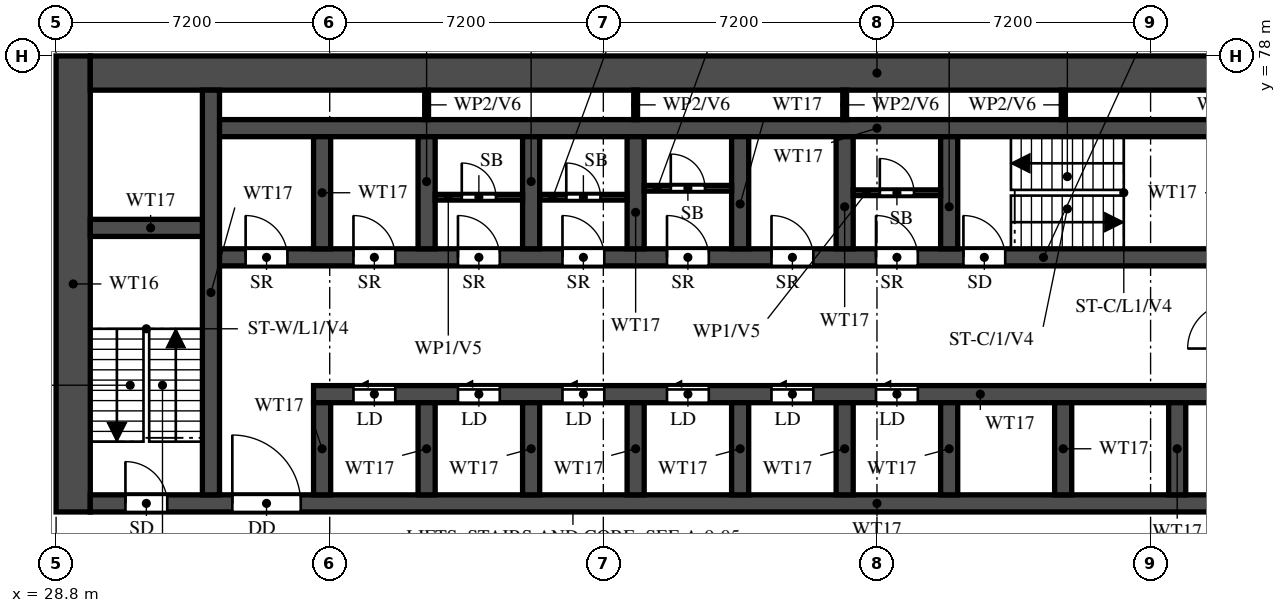
"""IFC4 building model, lengths in metres.
Left out: names, types, materials, properties, quantities, classifications, styles, units other than length and angle.
Written with IfcOpenShell. Run it as: python <this file> out.ifc"""

import sys

from ifc_helpers import new_model, si_unit, direction, frame, frame_2d, origin, place, context, subcontext, project, spatial, rectangle, extrude, element, fill, save


model = new_model("IFC4")
c1 = context("Model", 3, precision=1e-05, world=origin(), true_north=direction((0.0, 1.0)))
c2 = subcontext(c1, "Body", "Model", "MODEL_VIEW")
j1 = project(units=[si_unit("LENGTHUNIT", "METRE"), si_unit("PLANEANGLEUNIT", "RADIAN")], contexts=[c1])
p1 = place(None, origin())
s1 = spatial("IfcSite", under=j1, at=p1, CompositionType="ELEMENT")
p2 = place(p1, origin())
s2 = spatial("IfcBuilding", under=s1, at=p2, CompositionType="ELEMENT")
p3 = place(p2, frame((0.0, 0.0, 17.4)))
s3 = spatial("IfcBuildingStorey", under=s2, at=p3, CompositionType="ELEMENT", Elevation=17.4)
p4 = place(p3, frame((29.25, 66.0, 0.0), z_axis=(0.0, 0.0, 1.0), x_axis=(0.0, 1.0, 0.0)))
e1 = element("IfcWall", 1, at=p4, inside=s3, PredefinedType="SHEAR", context=c2, shape_type="SweptSolid", body=[
    extrude(rectangle(XDim=12.0, YDim=0.9, at=frame_2d((6.0, 0.0))), origin(), (0.0, 0.0, 1.0), 3.8),
])
p5 = place(p3, frame((29.7, 77.55, 0.0), z_axis=(0.0, 0.0, 1.0), x_axis=(1.0, 0.0, 0.0)))
e2 = element("IfcWall", 2, at=p5, inside=s3, PredefinedType="SHEAR", context=c2, shape_type="SweptSolid", body=[
    extrude(rectangle(XDim=41.4, YDim=0.9, at=frame_2d((20.7, 0.0))), origin(), (0.0, 0.0, 1.0), 3.8),
])
p6 = place(p3, frame((29.7, 66.225, 0.0), z_axis=(0.0, 0.0, 1.0), x_axis=(1.0, 0.0, 0.0)))
e3 = element("IfcWall", 3, at=p6, inside=s3, PredefinedType="SHEAR", context=c2, shape_type="SweptSolid", body=[
    extrude(rectangle(XDim=41.4, YDim=0.45, at=frame_2d((20.7, 0.0))), origin(), (0.0, 0.0, 1.0), 3.8),
])
p7 = place(p6, frame((0.925, 0.0, 0.0)))
e4 = element("IfcOpeningElement", 4, at=p7, cuts=e3, PredefinedType="OPENING", context=c2, shape_type="SweptSolid", body=[
    extrude(rectangle(XDim=1.1, YDim=2.1, at=frame_2d((0.55, 1.05))), frame((0.0, 0.235, 0.0), z_axis=(0.0, -1.0, 0.0), x_axis=(1.0, 0.0, 0.0)), (0.0, 0.0, 1.0), 0.47),
])
p8 = place(p6, frame((3.738, 0.0, 0.0)))
e5 = element("IfcOpeningElement", 5, at=p8, cuts=e3, PredefinedType="OPENING", context=c2, shape_type="SweptSolid", body=[
    extrude(rectangle(XDim=1.8, YDim=2.1, at=frame_2d((0.9, 1.05))), frame((0.0, 0.235, 0.0), z_axis=(0.0, -1.0, 0.0), x_axis=(1.0, 0.0, 0.0)), (0.0, 0.0, 1.0), 0.47),
])
p9 = place(p3, frame((35.575, 69.1, 0.0), z_axis=(0.0, 0.0, 1.0), x_axis=(1.0, 0.0, 0.0)))
e6 = element("IfcWall", 6, at=p9, inside=s3, PredefinedType="SHEAR", context=c2, shape_type="SweptSolid", body=[
    extrude(rectangle(XDim=24.2, YDim=0.45, at=frame_2d((12.1, 0.0))), origin(), (0.0, 0.0, 1.0), 3.8),
])
p10 = place(p9, frame((1.05, 0.0, 0.0)))
e7 = element("IfcOpeningElement", 7, at=p10, cuts=e6, PredefinedType="OPENING", context=c2, shape_type="SweptSolid", body=[
    extrude(rectangle(XDim=1.1, YDim=2.1, at=frame_2d((0.55, 1.05))), frame((0.0, 0.235, 0.0), z_axis=(0.0, -1.0, 0.0), x_axis=(1.0, 0.0, 0.0)), (0.0, 0.0, 1.0), 0.47),
])
p11 = place(p9, frame((3.8, 0.0, 0.0)))
e8 = element("IfcOpeningElement", 8, at=p11, cuts=e6, PredefinedType="OPENING", context=c2, shape_type="SweptSolid", body=[
    extrude(rectangle(XDim=1.1, YDim=2.1, at=frame_2d((0.55, 1.05))), frame((0.0, 0.235, 0.0), z_axis=(0.0, -1.0, 0.0), x_axis=(1.0, 0.0, 0.0)), (0.0, 0.0, 1.0), 0.47),
])
p12 = place(p9, frame((6.55, 0.0, 0.0)))
e9 = element("IfcOpeningElement", 9, at=p12, cuts=e6, PredefinedType="OPENING", context=c2, shape_type="SweptSolid", body=[
    extrude(rectangle(XDim=1.1, YDim=2.1, at=frame_2d((0.55, 1.05))), frame((0.0, 0.235, 0.0), z_axis=(0.0, -1.0, 0.0), x_axis=(1.0, 0.0, 0.0)), (0.0, 0.0, 1.0), 0.47),
])
p13 = place(p9, frame((9.3, 0.0, 0.0)))
e10 = element("IfcOpeningElement", 10, at=p13, cuts=e6, PredefinedType="OPENING", context=c2, shape_type="SweptSolid", body=[
    extrude(rectangle(XDim=1.1, YDim=2.1, at=frame_2d((0.55, 1.05))), frame((0.0, 0.235, 0.0), z_axis=(0.0, -1.0, 0.0), x_axis=(1.0, 0.0, 0.0)), (0.0, 0.0, 1.0), 0.47),
])
p14 = place(p9, frame((12.05, 0.0, 0.0)))
e11 = element("IfcOpeningElement", 11, at=p14, cuts=e6, PredefinedType="OPENING", context=c2, shape_type="SweptSolid", body=[
    extrude(rectangle(XDim=1.1, YDim=2.1, at=frame_2d((0.55, 1.05))), frame((0.0, 0.235, 0.0), z_axis=(0.0, -1.0, 0.0), x_axis=(1.0, 0.0, 0.0)), (0.0, 0.0, 1.0), 0.47),
])
p15 = place(p9, frame((14.8, 0.0, 0.0)))
e12 = element("IfcOpeningElement", 12, at=p15, cuts=e6, PredefinedType="OPENING", context=c2, shape_type="SweptSolid", body=[
    extrude(rectangle(XDim=1.1, YDim=2.1, at=frame_2d((0.55, 1.05))), frame((0.0, 0.235, 0.0), z_axis=(0.0, -1.0, 0.0), x_axis=(1.0, 0.0, 0.0)), (0.0, 0.0, 1.0), 0.47),
])
p16 = place(p3, frame((32.875, 72.7, 0.0), z_axis=(0.0, 0.0, 1.0), x_axis=(1.0, 0.0, 0.0)))
e13 = element("IfcWall", 13, at=p16, inside=s3, PredefinedType="SHEAR", context=c2, shape_type="SweptSolid", body=[
    extrude(rectangle(XDim=35.05, YDim=0.45, at=frame_2d((17.525, 0.0))), origin(), (0.0, 0.0, 1.0), 3.8),
])
p17 = place(p16, frame((19.8, 0.0, 0.0)))
e14 = element("IfcOpeningElement", 14, at=p17, cuts=e13, PredefinedType="OPENING", context=c2, shape_type="SweptSolid", body=[
    extrude(rectangle(XDim=1.1, YDim=2.1, at=frame_2d((0.55, 1.05))), frame((0.0, 0.235, 0.0), z_axis=(0.0, -1.0, 0.0), x_axis=(1.0, 0.0, 0.0)), (0.0, 0.0, 1.0), 0.47),
])
p18 = place(p16, frame((27.65, 0.0, 0.0)))
e15 = element("IfcOpeningElement", 15, at=p18, cuts=e13, PredefinedType="OPENING", context=c2, shape_type="SweptSolid", body=[
    extrude(rectangle(XDim=1.1, YDim=2.1, at=frame_2d((0.55, 1.05))), frame((0.0, 0.235, 0.0), z_axis=(0.0, -1.0, 0.0), x_axis=(1.0, 0.0, 0.0)), (0.0, 0.0, 1.0), 0.47),
])
p19 = place(p16, frame((30.25, 0.0, 0.0)))
e16 = element("IfcOpeningElement", 16, at=p19, cuts=e13, PredefinedType="OPENING", context=c2, shape_type="SweptSolid", body=[
    extrude(rectangle(XDim=1.1, YDim=2.1, at=frame_2d((0.55, 1.05))), frame((0.0, 0.235, 0.0), z_axis=(0.0, -1.0, 0.0), x_axis=(1.0, 0.0, 0.0)), (0.0, 0.0, 1.0), 0.47),
])
p20 = place(p16, frame((3.75, 0.0, 0.0)))
e17 = element("IfcOpeningElement", 17, at=p20, cuts=e13, PredefinedType="OPENING", context=c2, shape_type="SweptSolid", body=[
    extrude(rectangle(XDim=1.1, YDim=2.1, at=frame_2d((0.55, 1.05))), frame((0.0, 0.235, 0.0), z_axis=(0.0, -1.0, 0.0), x_axis=(1.0, 0.0, 0.0)), (0.0, 0.0, 1.0), 0.47),
])
p21 = place(p16, frame((6.5, 0.0, 0.0)))
e18 = element("IfcOpeningElement", 18, at=p21, cuts=e13, PredefinedType="OPENING", context=c2, shape_type="SweptSolid", body=[
    extrude(rectangle(XDim=1.1, YDim=2.1, at=frame_2d((0.55, 1.05))), frame((0.0, 0.235, 0.0), z_axis=(0.0, -1.0, 0.0), x_axis=(1.0, 0.0, 0.0)), (0.0, 0.0, 1.0), 0.47),
])
p22 = place(p16, frame((9.25, 0.0, 0.0)))
e19 = element("IfcOpeningElement", 19, at=p22, cuts=e13, PredefinedType="OPENING", context=c2, shape_type="SweptSolid", body=[
    extrude(rectangle(XDim=1.1, YDim=2.1, at=frame_2d((0.55, 1.05))), frame((0.0, 0.235, 0.0), z_axis=(0.0, -1.0, 0.0), x_axis=(1.0, 0.0, 0.0)), (0.0, 0.0, 1.0), 0.47),
])
p23 = place(p16, frame((12.0, 0.0, 0.0)))
e20 = element("IfcOpeningElement", 20, at=p23, cuts=e13, PredefinedType="OPENING", context=c2, shape_type="SweptSolid", body=[
    extrude(rectangle(XDim=1.1, YDim=2.1, at=frame_2d((0.55, 1.05))), frame((0.0, 0.235, 0.0), z_axis=(0.0, -1.0, 0.0), x_axis=(1.0, 0.0, 0.0)), (0.0, 0.0, 1.0), 0.47),
])
p24 = place(p16, frame((14.75, 0.0, 0.0)))
e21 = element("IfcOpeningElement", 21, at=p24, cuts=e13, PredefinedType="OPENING", context=c2, shape_type="SweptSolid", body=[
    extrude(rectangle(XDim=1.1, YDim=2.1, at=frame_2d((0.55, 1.05))), frame((0.0, 0.235, 0.0), z_axis=(0.0, -1.0, 0.0), x_axis=(1.0, 0.0, 0.0)), (0.0, 0.0, 1.0), 0.47),
])
p25 = place(p16, frame((17.5, 0.0, 0.0)))
e22 = element("IfcOpeningElement", 22, at=p25, cuts=e13, PredefinedType="OPENING", context=c2, shape_type="SweptSolid", body=[
    extrude(rectangle(XDim=1.1, YDim=2.1, at=frame_2d((0.55, 1.05))), frame((0.0, 0.235, 0.0), z_axis=(0.0, -1.0, 0.0), x_axis=(1.0, 0.0, 0.0)), (0.0, 0.0, 1.0), 0.47),
])
p26 = place(p16, frame((0.913, 0.0, 0.0)))
e23 = element("IfcOpeningElement", 23, at=p26, cuts=e13, PredefinedType="OPENING", context=c2, shape_type="SweptSolid", body=[
    extrude(rectangle(XDim=1.1, YDim=2.1, at=frame_2d((0.55, 1.05))), frame((0.0, 0.235, 0.0), z_axis=(0.0, -1.0, 0.0), x_axis=(1.0, 0.0, 0.0)), (0.0, 0.0, 1.0), 0.47),
])
p27 = place(p3, frame((32.875, 76.1, 0.0), z_axis=(0.0, 0.0, 1.0), x_axis=(1.0, 0.0, 0.0)))
e24 = element("IfcWall", 24, at=p27, inside=s3, PredefinedType="SHEAR", context=c2, shape_type="SweptSolid", body=[
    extrude(rectangle(XDim=35.05, YDim=0.45, at=frame_2d((17.525, 0.0))), origin(), (0.0, 0.0, 1.0), 3.8),
])
p28 = place(p3, frame((29.7, 73.475, 0.0), z_axis=(0.0, 0.0, 1.0), x_axis=(1.0, 0.0, 0.0)))
e25 = element("IfcWall", 25, at=p28, inside=s3, PredefinedType="SHEAR", context=c2, shape_type="SweptSolid", body=[
    extrude(rectangle(XDim=3.175, YDim=0.45, at=frame_2d((1.587, 0.0))), origin(), (0.0, 0.0, 1.0), 3.8),
])
p29 = place(p3, frame((32.875, 66.45, 0.0), z_axis=(0.0, 0.0, 1.0), x_axis=(0.0, 1.0, 0.0)))
e26 = element("IfcWall", 26, at=p29, inside=s3, PredefinedType="SHEAR", context=c2, shape_type="SweptSolid", body=[
    extrude(rectangle(XDim=10.65, YDim=0.45, at=frame_2d((5.325, 0.0))), origin(), (0.0, 0.0, 1.0), 3.8),
])
for number, where, z_axis, x_axis in (
    (27, (35.8, 66.45, 0.0), (0.0, 0.0, 1.0), (0.0, 1.0, 0.0)),
    (28, (38.55, 66.45, 0.0), (0.0, 0.0, 1.0), (0.0, 1.0, 0.0)),
    (29, (41.3, 66.45, 0.0), (0.0, 0.0, 1.0), (0.0, 1.0, 0.0)),
    (30, (44.05, 66.45, 0.0), (0.0, 0.0, 1.0), (0.0, 1.0, 0.0)),
    (31, (46.8, 66.45, 0.0), (0.0, 0.0, 1.0), (0.0, 1.0, 0.0)),
    (32, (49.55, 66.45, 0.0), (0.0, 0.0, 1.0), (0.0, 1.0, 0.0)),
    (33, (52.3, 66.45, 0.0), (0.0, 0.0, 1.0), (0.0, 1.0, 0.0)),
    (34, (55.3, 66.45, 0.0), (0.0, 0.0, 1.0), (0.0, 1.0, 0.0)),
    (35, (58.3, 66.45, 0.0), (0.0, 0.0, 1.0), (0.0, 1.0, 0.0)),
):
    element("IfcWall", number, at=place(p3, frame(where, z_axis=z_axis, x_axis=x_axis)), inside=s3, PredefinedType="SHEAR", context=c2, shape_type="SweptSolid", body=[
        extrude(rectangle(XDim=2.425, YDim=0.45, at=frame_2d((1.212, 0.0))), origin(), (0.0, 0.0, 1.0), 3.8),
    ])
for number, where, z_axis, x_axis in (
    (36, (35.8, 72.925, 0.0), (0.0, 0.0, 1.0), (0.0, 1.0, 0.0)),
    (37, (38.55, 72.925, 0.0), (0.0, 0.0, 1.0), (0.0, 1.0, 0.0)),
    (38, (41.3, 72.925, 0.0), (0.0, 0.0, 1.0), (0.0, 1.0, 0.0)),
    (39, (44.05, 72.925, 0.0), (0.0, 0.0, 1.0), (0.0, 1.0, 0.0)),
    (40, (46.8, 72.925, 0.0), (0.0, 0.0, 1.0), (0.0, 1.0, 0.0)),
    (41, (49.55, 72.925, 0.0), (0.0, 0.0, 1.0), (0.0, 1.0, 0.0)),
    (42, (52.3, 72.925, 0.0), (0.0, 0.0, 1.0), (0.0, 1.0, 0.0)),
):
    element("IfcWall", number, at=place(p3, frame(where, z_axis=z_axis, x_axis=x_axis)), inside=s3, PredefinedType="SHEAR", context=c2, shape_type="SweptSolid", body=[
        extrude(rectangle(XDim=2.95, YDim=0.45, at=frame_2d((1.475, 0.0))), origin(), (0.0, 0.0, 1.0), 3.8),
    ])
p30 = place(p3, frame((38.775, 74.282, 0.0), z_axis=(0.0, 0.0, 1.0), x_axis=(1.0, 0.0, 0.0)))
e43 = element("IfcWall", 43, at=p30, inside=s3, PredefinedType="PARTITIONING", context=c2, shape_type="SweptSolid", body=[
    extrude(rectangle(XDim=2.3, YDim=0.15, at=frame_2d((1.15, 0.0))), origin(), (0.0, 0.0, 1.0), 3.8),
])
p31 = place(p30, frame((0.7, 0.0, 0.0)))
e44 = element("IfcOpeningElement", 44, at=p31, cuts=e43, PredefinedType="OPENING", context=c2, shape_type="SweptSolid", body=[
    extrude(rectangle(XDim=0.9, YDim=2.1, at=frame_2d((0.45, 1.05))), frame((0.0, 0.085, 0.0), z_axis=(0.0, -1.0, 0.0), x_axis=(1.0, 0.0, 0.0)), (0.0, 0.0, 1.0), 0.17),
])
p32 = place(p3, frame((41.525, 74.282, 0.0), z_axis=(0.0, 0.0, 1.0), x_axis=(1.0, 0.0, 0.0)))
e45 = element("IfcWall", 45, at=p32, inside=s3, PredefinedType="PARTITIONING", context=c2, shape_type="SweptSolid", body=[
    extrude(rectangle(XDim=2.3, YDim=0.15, at=frame_2d((1.15, 0.0))), origin(), (0.0, 0.0, 1.0), 3.8),
])
p33 = place(p32, frame((0.7, 0.0, 0.0)))
e46 = element("IfcOpeningElement", 46, at=p33, cuts=e45, PredefinedType="OPENING", context=c2, shape_type="SweptSolid", body=[
    extrude(rectangle(XDim=0.9, YDim=2.1, at=frame_2d((0.45, 1.05))), frame((0.0, 0.085, 0.0), z_axis=(0.0, -1.0, 0.0), x_axis=(1.0, 0.0, 0.0)), (0.0, 0.0, 1.0), 0.17),
])
p34 = place(p3, frame((44.275, 74.518, 0.0), z_axis=(0.0, 0.0, 1.0), x_axis=(1.0, 0.0, 0.0)))
e47 = element("IfcWall", 47, at=p34, inside=s3, PredefinedType="PARTITIONING", context=c2, shape_type="SweptSolid", body=[
    extrude(rectangle(XDim=2.3, YDim=0.15, at=frame_2d((1.15, 0.0))), origin(), (0.0, 0.0, 1.0), 3.8),
])
p35 = place(p34, frame((0.7, 0.0, 0.0)))
e48 = element("IfcOpeningElement", 48, at=p35, cuts=e47, PredefinedType="OPENING", context=c2, shape_type="SweptSolid", body=[
    extrude(rectangle(XDim=0.9, YDim=2.1, at=frame_2d((0.45, 1.05))), frame((0.0, 0.085, 0.0), z_axis=(0.0, -1.0, 0.0), x_axis=(1.0, 0.0, 0.0)), (0.0, 0.0, 1.0), 0.17),
])
p36 = place(p3, frame((49.775, 74.4, 0.0), z_axis=(0.0, 0.0, 1.0), x_axis=(1.0, 0.0, 0.0)))
e49 = element("IfcWall", 49, at=p36, inside=s3, PredefinedType="PARTITIONING", context=c2, shape_type="SweptSolid", body=[
    extrude(rectangle(XDim=2.3, YDim=0.15, at=frame_2d((1.15, 0.0))), origin(), (0.0, 0.0, 1.0), 3.8),
])
p37 = place(p36, frame((0.7, 0.0, 0.0)))
e50 = element("IfcOpeningElement", 50, at=p37, cuts=e49, PredefinedType="OPENING", context=c2, shape_type="SweptSolid", body=[
    extrude(rectangle(XDim=0.9, YDim=2.1, at=frame_2d((0.45, 1.05))), frame((0.0, 0.085, 0.0), z_axis=(0.0, -1.0, 0.0), x_axis=(1.0, 0.0, 0.0)), (0.0, 0.0, 1.0), 0.17),
])
for number, where, z_axis, x_axis in (
    (51, (38.55, 76.325, 0.0), (0.0, 0.0, 1.0), (0.0, 1.0, 0.0)),
    (52, (44.05, 76.325, 0.0), (0.0, 0.0, 1.0), (0.0, 1.0, 0.0)),
    (53, (49.55, 76.325, 0.0), (0.0, 0.0, 1.0), (0.0, 1.0, 0.0)),
    (54, (55.3, 76.325, 0.0), (0.0, 0.0, 1.0), (0.0, 1.0, 0.0)),
):
    element("IfcWall", number, at=place(p3, frame(where, z_axis=z_axis, x_axis=x_axis)), inside=s3, PredefinedType="PARTITIONING", context=c2, shape_type="SweptSolid", body=[
        extrude(rectangle(XDim=0.775, YDim=0.1, at=frame_2d((0.388, 0.0))), origin(), (0.0, 0.0, 1.0), 3.8),
    ])
p38 = place(p7, origin())
e55 = element("IfcDoor", 55, at=p38, inside=s3, OperationType="SINGLE_SWING_LEFT", PredefinedType="DOOR", context=c2, shape_type="SweptSolid", body=[
    extrude(rectangle(XDim=1.1, YDim=2.1, at=frame_2d((0.55, 1.05))), frame((0.0, 0.025, 0.0), z_axis=(0.0, -1.0, 0.0), x_axis=(1.0, 0.0, 0.0)), (0.0, 0.0, 1.0), 0.05),
])
fill(e4, e55)
p39 = place(p17, origin())
e56 = element("IfcDoor", 56, at=p39, inside=s3, OperationType="SINGLE_SWING_LEFT", PredefinedType="DOOR", context=c2, shape_type="SweptSolid", body=[
    extrude(rectangle(XDim=1.1, YDim=2.1, at=frame_2d((0.55, 1.05))), frame((0.0, 0.025, 0.0), z_axis=(0.0, -1.0, 0.0), x_axis=(1.0, 0.0, 0.0)), (0.0, 0.0, 1.0), 0.05),
])
fill(e14, e56)
p40 = place(p8, origin())
e57 = element("IfcDoor", 57, at=p40, inside=s3, OperationType="DOUBLE_DOOR_SINGLE_SWING", PredefinedType="DOOR", context=c2, shape_type="SweptSolid", body=[
    extrude(rectangle(XDim=1.8, YDim=2.1, at=frame_2d((0.9, 1.05))), frame((0.0, 0.025, 0.0), z_axis=(0.0, -1.0, 0.0), x_axis=(1.0, 0.0, 0.0)), (0.0, 0.0, 1.0), 0.05),
])
fill(e5, e57)
p41 = place(p10, origin())
e58 = element("IfcDoor", 58, at=p41, inside=s3, OperationType="SLIDING_TO_LEFT", PredefinedType="DOOR", context=c2, shape_type="SweptSolid", body=[
    extrude(rectangle(XDim=1.1, YDim=2.1, at=frame_2d((0.55, 1.05))), frame((0.0, 0.025, 0.0), z_axis=(0.0, -1.0, 0.0), x_axis=(1.0, 0.0, 0.0)), (0.0, 0.0, 1.0), 0.05),
])
fill(e7, e58)
p42 = place(p11, origin())
e59 = element("IfcDoor", 59, at=p42, inside=s3, OperationType="SLIDING_TO_LEFT", PredefinedType="DOOR", context=c2, shape_type="SweptSolid", body=[
    extrude(rectangle(XDim=1.1, YDim=2.1, at=frame_2d((0.55, 1.05))), frame((0.0, 0.025, 0.0), z_axis=(0.0, -1.0, 0.0), x_axis=(1.0, 0.0, 0.0)), (0.0, 0.0, 1.0), 0.05),
])
fill(e8, e59)
p43 = place(p12, origin())
e60 = element("IfcDoor", 60, at=p43, inside=s3, OperationType="SLIDING_TO_LEFT", PredefinedType="DOOR", context=c2, shape_type="SweptSolid", body=[
    extrude(rectangle(XDim=1.1, YDim=2.1, at=frame_2d((0.55, 1.05))), frame((0.0, 0.025, 0.0), z_axis=(0.0, -1.0, 0.0), x_axis=(1.0, 0.0, 0.0)), (0.0, 0.0, 1.0), 0.05),
])
fill(e9, e60)
p44 = place(p13, origin())
e61 = element("IfcDoor", 61, at=p44, inside=s3, OperationType="SLIDING_TO_LEFT", PredefinedType="DOOR", context=c2, shape_type="SweptSolid", body=[
    extrude(rectangle(XDim=1.1, YDim=2.1, at=frame_2d((0.55, 1.05))), frame((0.0, 0.025, 0.0), z_axis=(0.0, -1.0, 0.0), x_axis=(1.0, 0.0, 0.0)), (0.0, 0.0, 1.0), 0.05),
])
fill(e10, e61)
p45 = place(p14, origin())
e62 = element("IfcDoor", 62, at=p45, inside=s3, OperationType="SLIDING_TO_LEFT", PredefinedType="DOOR", context=c2, shape_type="SweptSolid", body=[
    extrude(rectangle(XDim=1.1, YDim=2.1, at=frame_2d((0.55, 1.05))), frame((0.0, 0.025, 0.0), z_axis=(0.0, -1.0, 0.0), x_axis=(1.0, 0.0, 0.0)), (0.0, 0.0, 1.0), 0.05),
])
fill(e11, e62)
p46 = place(p15, origin())
e63 = element("IfcDoor", 63, at=p46, inside=s3, OperationType="SLIDING_TO_LEFT", PredefinedType="DOOR", context=c2, shape_type="SweptSolid", body=[
    extrude(rectangle(XDim=1.1, YDim=2.1, at=frame_2d((0.55, 1.05))), frame((0.0, 0.025, 0.0), z_axis=(0.0, -1.0, 0.0), x_axis=(1.0, 0.0, 0.0)), (0.0, 0.0, 1.0), 0.05),
])
fill(e12, e63)
p47 = place(p20, origin())
e64 = element("IfcDoor", 64, at=p47, inside=s3, OperationType="SINGLE_SWING_LEFT", PredefinedType="DOOR", context=c2, shape_type="SweptSolid", body=[
    extrude(rectangle(XDim=1.1, YDim=2.1, at=frame_2d((0.55, 1.05))), frame((0.0, 0.025, 0.0), z_axis=(0.0, -1.0, 0.0), x_axis=(1.0, 0.0, 0.0)), (0.0, 0.0, 1.0), 0.05),
])
fill(e17, e64)
p48 = place(p21, origin())
e65 = element("IfcDoor", 65, at=p48, inside=s3, OperationType="SINGLE_SWING_LEFT", PredefinedType="DOOR", context=c2, shape_type="SweptSolid", body=[
    extrude(rectangle(XDim=1.1, YDim=2.1, at=frame_2d((0.55, 1.05))), frame((0.0, 0.025, 0.0), z_axis=(0.0, -1.0, 0.0), x_axis=(1.0, 0.0, 0.0)), (0.0, 0.0, 1.0), 0.05),
])
fill(e18, e65)
p49 = place(p31, origin())
e66 = element("IfcDoor", 66, at=p49, inside=s3, OperationType="SINGLE_SWING_RIGHT", PredefinedType="DOOR", context=c2, shape_type="SweptSolid", body=[
    extrude(rectangle(XDim=0.9, YDim=2.1, at=frame_2d((0.45, 1.05))), frame((0.0, 0.025, 0.0), z_axis=(0.0, -1.0, 0.0), x_axis=(1.0, 0.0, 0.0)), (0.0, 0.0, 1.0), 0.05),
])
fill(e44, e66)
p50 = place(p22, origin())
e67 = element("IfcDoor", 67, at=p50, inside=s3, OperationType="SINGLE_SWING_LEFT", PredefinedType="DOOR", context=c2, shape_type="SweptSolid", body=[
    extrude(rectangle(XDim=1.1, YDim=2.1, at=frame_2d((0.55, 1.05))), frame((0.0, 0.025, 0.0), z_axis=(0.0, -1.0, 0.0), x_axis=(1.0, 0.0, 0.0)), (0.0, 0.0, 1.0), 0.05),
])
fill(e19, e67)
p51 = place(p33, origin())
e68 = element("IfcDoor", 68, at=p51, inside=s3, OperationType="SINGLE_SWING_LEFT", PredefinedType="DOOR", context=c2, shape_type="SweptSolid", body=[
    extrude(rectangle(XDim=0.9, YDim=2.1, at=frame_2d((0.45, 1.05))), frame((0.0, 0.025, 0.0), z_axis=(0.0, -1.0, 0.0), x_axis=(1.0, 0.0, 0.0)), (0.0, 0.0, 1.0), 0.05),
])
fill(e46, e68)
p52 = place(p23, origin())
e69 = element("IfcDoor", 69, at=p52, inside=s3, OperationType="SINGLE_SWING_LEFT", PredefinedType="DOOR", context=c2, shape_type="SweptSolid", body=[
    extrude(rectangle(XDim=1.1, YDim=2.1, at=frame_2d((0.55, 1.05))), frame((0.0, 0.025, 0.0), z_axis=(0.0, -1.0, 0.0), x_axis=(1.0, 0.0, 0.0)), (0.0, 0.0, 1.0), 0.05),
])
fill(e20, e69)
p53 = place(p35, origin())
e70 = element("IfcDoor", 70, at=p53, inside=s3, OperationType="SINGLE_SWING_LEFT", PredefinedType="DOOR", context=c2, shape_type="SweptSolid", body=[
    extrude(rectangle(XDim=0.9, YDim=2.1, at=frame_2d((0.45, 1.05))), frame((0.0, 0.025, 0.0), z_axis=(0.0, -1.0, 0.0), x_axis=(1.0, 0.0, 0.0)), (0.0, 0.0, 1.0), 0.05),
])
fill(e48, e70)
p54 = place(p24, origin())
e71 = element("IfcDoor", 71, at=p54, inside=s3, OperationType="SINGLE_SWING_LEFT", PredefinedType="DOOR", context=c2, shape_type="SweptSolid", body=[
    extrude(rectangle(XDim=1.1, YDim=2.1, at=frame_2d((0.55, 1.05))), frame((0.0, 0.025, 0.0), z_axis=(0.0, -1.0, 0.0), x_axis=(1.0, 0.0, 0.0)), (0.0, 0.0, 1.0), 0.05),
])
fill(e21, e71)
p55 = place(p25, origin())
e72 = element("IfcDoor", 72, at=p55, inside=s3, OperationType="SINGLE_SWING_LEFT", PredefinedType="DOOR", context=c2, shape_type="SweptSolid", body=[
    extrude(rectangle(XDim=1.1, YDim=2.1, at=frame_2d((0.55, 1.05))), frame((0.0, 0.025, 0.0), z_axis=(0.0, -1.0, 0.0), x_axis=(1.0, 0.0, 0.0)), (0.0, 0.0, 1.0), 0.05),
])
fill(e22, e72)
p56 = place(p37, origin())
e73 = element("IfcDoor", 73, at=p56, inside=s3, OperationType="SINGLE_SWING_RIGHT", PredefinedType="DOOR", context=c2, shape_type="SweptSolid", body=[
    extrude(rectangle(XDim=0.9, YDim=2.1, at=frame_2d((0.45, 1.05))), frame((0.0, 0.025, 0.0), z_axis=(0.0, -1.0, 0.0), x_axis=(1.0, 0.0, 0.0)), (0.0, 0.0, 1.0), 0.05),
])
fill(e50, e73)
p57 = place(p26, origin())
e74 = element("IfcDoor", 74, at=p57, inside=s3, OperationType="SINGLE_SWING_LEFT", PredefinedType="DOOR", context=c2, shape_type="SweptSolid", body=[
    extrude(rectangle(XDim=1.1, YDim=2.1, at=frame_2d((0.55, 1.05))), frame((0.0, 0.025, 0.0), z_axis=(0.0, -1.0, 0.0), x_axis=(1.0, 0.0, 0.0)), (0.0, 0.0, 1.0), 0.05),
])
fill(e23, e74)
save(model, sys.argv[1])
